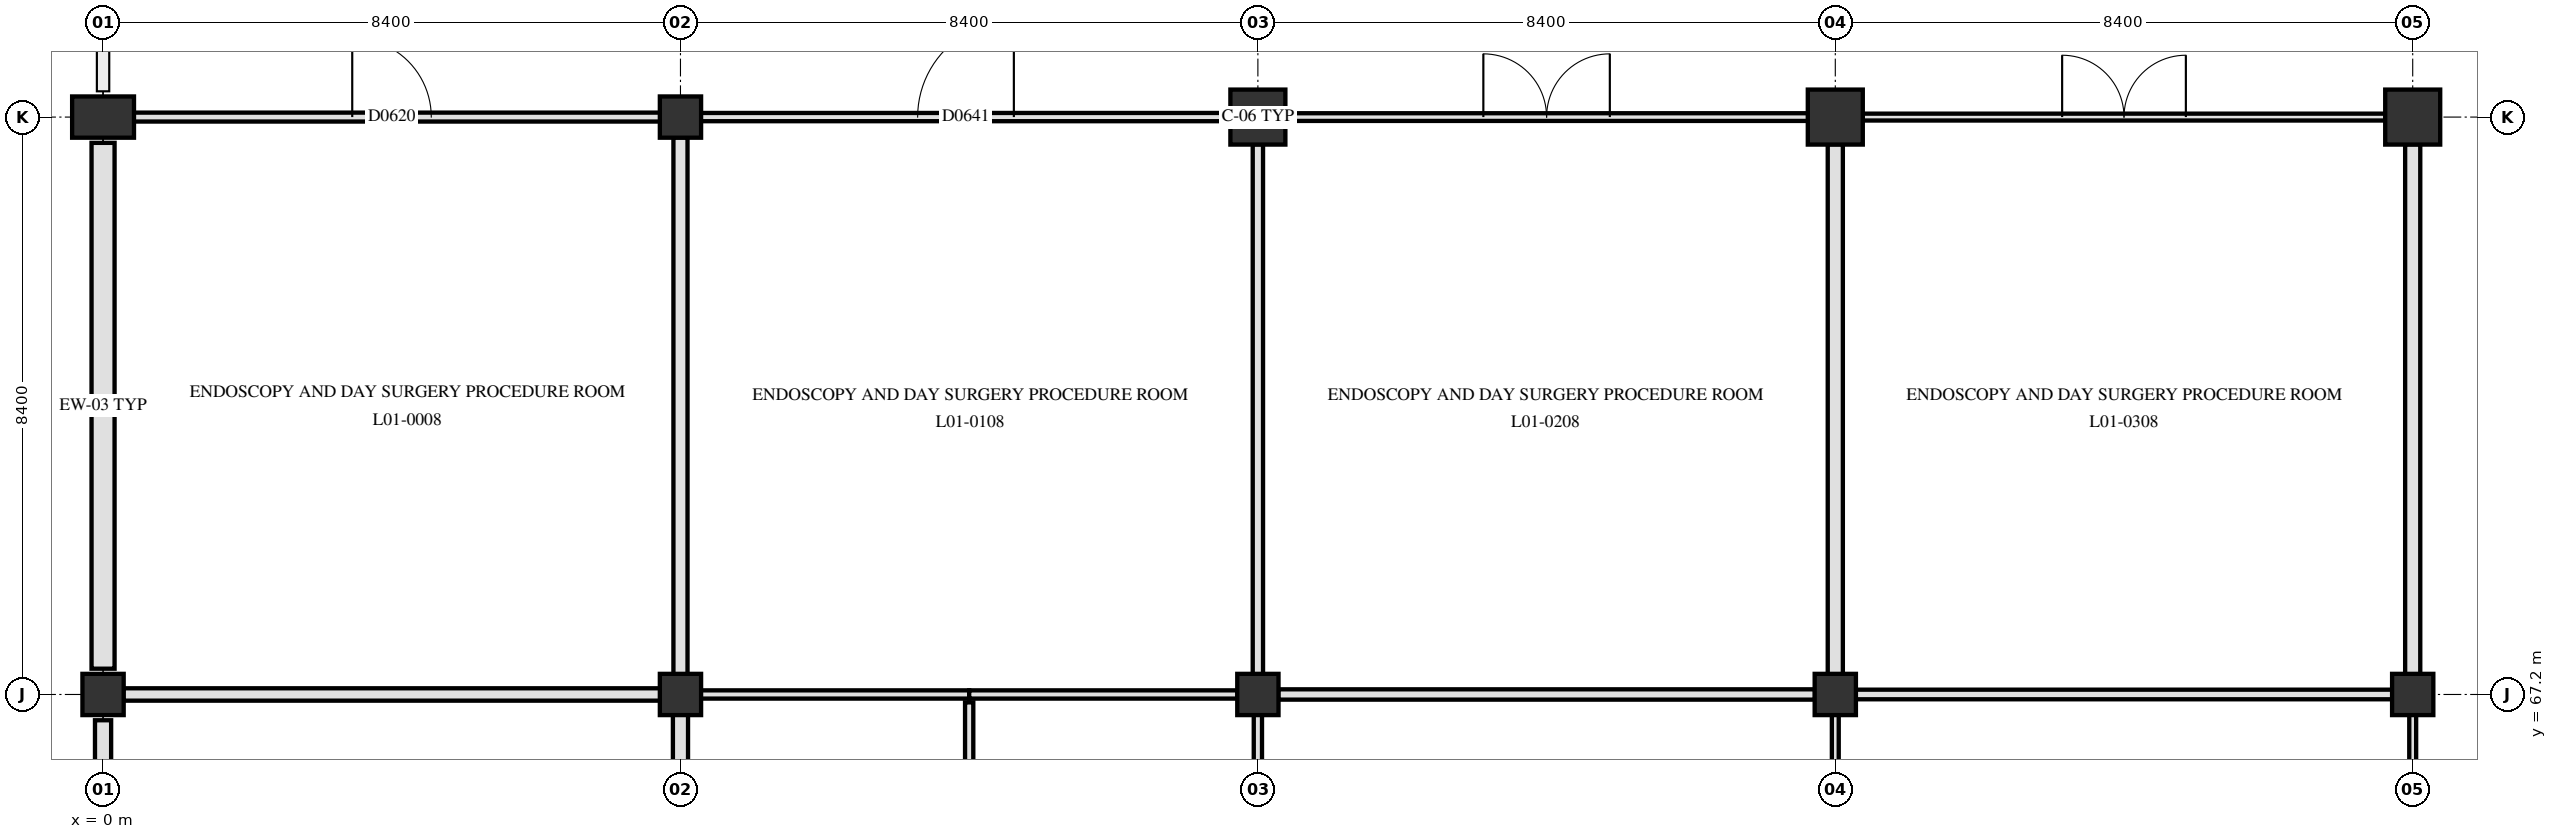
"""IFC4 building model, lengths in metres.
Left out: names, types, materials, properties, quantities, classifications, styles, units other than length and angle.
Written with IfcOpenShell. Run it as: python <this file> out.ifc"""

import sys

from ifc_helpers import new_model, si_unit, direction, frame, frame_2d, origin, origin_2d, place, context, subcontext, project, spatial, rectangle, circle, extrude, element, fill, save


model = new_model("IFC4")
c1 = context("Model", 3, precision=1e-05, world=origin(), true_north=direction((0.0, 1.0)))
c2 = subcontext(c1, "Body", "Model", "MODEL_VIEW")
j1 = project(units=[si_unit("LENGTHUNIT", "METRE"), si_unit("PLANEANGLEUNIT", "RADIAN")], contexts=[c1])
p1 = place(None, origin())
s1 = spatial("IfcSite", under=j1, at=p1, CompositionType="ELEMENT")
p2 = place(p1, origin())
s2 = spatial("IfcBuilding", under=s1, at=p2, CompositionType="ELEMENT")
p3 = place(p2, frame((0.0, 0.0, 4.8)))
s3 = spatial("IfcBuildingStorey", under=s2, at=p3, CompositionType="ELEMENT", Elevation=4.8)
p4 = place(p3, frame((0.0, 67.2, 0.0), z_axis=(0.0, 0.0, 1.0), x_axis=(1.0, 0.0, 0.0)))
e1 = element("IfcColumn", 1, at=p4, inside=s3, PredefinedType="COLUMN", context=c2, shape_type="SweptSolid", body=[
    extrude(rectangle(XDim=0.6, YDim=0.6, at=origin_2d()), origin(), (0.0, 0.0, 1.0), 4.5),
])
p5 = place(p3, frame((0.0, 75.6, 0.0), z_axis=(0.0, 0.0, 1.0), x_axis=(0.0, 1.0, 0.0)))
e2 = element("IfcColumn", 2, at=p5, inside=s3, PredefinedType="PILASTER", context=c2, shape_type="SweptSolid", body=[
    extrude(rectangle(XDim=0.6, YDim=0.9, at=origin_2d()), origin(), (0.0, 0.0, 1.0), 4.5),
])
for number, where, z_axis, x_axis in (
    (3, (8.4, 67.2, 0.0), (0.0, 0.0, 1.0), (1.0, 0.0, 0.0)),
    (4, (8.4, 75.6, 0.0), (0.0, 0.0, 1.0), (1.0, 0.0, 0.0)),
    (5, (16.8, 67.2, 0.0), (0.0, 0.0, 1.0), (1.0, 0.0, 0.0)),
):
    element("IfcColumn", number, at=place(p3, frame(where, z_axis=z_axis, x_axis=x_axis)), inside=s3, PredefinedType="COLUMN", context=c2, shape_type="SweptSolid", body=[
        extrude(rectangle(XDim=0.6, YDim=0.6, at=origin_2d()), origin(), (0.0, 0.0, 1.0), 4.5),
    ])
p6 = place(p3, frame((16.8, 75.6, 0.0), z_axis=(0.0, 0.0, 1.0), x_axis=(1.0, 0.0, 0.0)))
e6 = element("IfcColumn", 6, at=p6, inside=s3, PredefinedType="COLUMN", context=c2, shape_type="SweptSolid", body=[
    extrude(circle(Radius=0.4, at=origin_2d()), origin(), (0.0, 0.0, 1.0), 4.5),
])
p7 = place(p3, frame((25.2, 67.2, 0.0), z_axis=(0.0, 0.0, 1.0), x_axis=(1.0, 0.0, 0.0)))
e7 = element("IfcColumn", 7, at=p7, inside=s3, PredefinedType="COLUMN", context=c2, shape_type="SweptSolid", body=[
    extrude(rectangle(XDim=0.6, YDim=0.6, at=origin_2d()), origin(), (0.0, 0.0, 1.0), 4.5),
])
p8 = place(p3, frame((25.2, 75.6, 0.0), z_axis=(0.0, 0.0, 1.0), x_axis=(1.0, 0.0, 0.0)))
e8 = element("IfcColumn", 8, at=p8, inside=s3, PredefinedType="COLUMN", context=c2, shape_type="SweptSolid", body=[
    extrude(circle(Radius=0.4, at=origin_2d()), origin(), (0.0, 0.0, 1.0), 4.5),
])
p9 = place(p3, frame((33.6, 67.2, 0.0), z_axis=(0.0, 0.0, 1.0), x_axis=(1.0, 0.0, 0.0)))
e9 = element("IfcColumn", 9, at=p9, inside=s3, PredefinedType="COLUMN", context=c2, shape_type="SweptSolid", body=[
    extrude(rectangle(XDim=0.6, YDim=0.6, at=origin_2d()), origin(), (0.0, 0.0, 1.0), 4.5),
])
p10 = place(p3, frame((33.6, 75.6, 0.0), z_axis=(0.0, 0.0, 1.0), x_axis=(1.0, 0.0, 0.0)))
e10 = element("IfcColumn", 10, at=p10, inside=s3, PredefinedType="COLUMN", context=c2, shape_type="SweptSolid", body=[
    extrude(circle(Radius=0.4, at=origin_2d()), origin(), (0.0, 0.0, 1.0), 4.5),
])
p11 = place(p3, frame((0.0, 59.175, 0.0), z_axis=(0.0, 0.0, 1.0), x_axis=(0.0, 1.0, 0.0)))
e11 = element("IfcWall", 11, at=p11, inside=s3, PredefinedType="SOLIDWALL", context=c2, shape_type="SweptSolid", body=[
    extrude(rectangle(XDim=7.65, YDim=0.235, at=frame_2d((3.825, 0.0))), origin(), (0.0, 0.0, 1.0), 3.44),
])
p12 = place(p11, frame((1.137, 0.0, 0.85)))
e12 = element("IfcOpeningElement", 12, at=p12, cuts=e11, PredefinedType="OPENING", context=c2, shape_type="SweptSolid", body=[
    extrude(rectangle(XDim=1.55, YDim=1.54, at=frame_2d((0.775, 0.77))), frame((0.0, 0.127, 0.0), z_axis=(0.0, -1.0, 0.0), x_axis=(1.0, 0.0, 0.0)), (0.0, 0.0, 1.0), 0.255),
])
p13 = place(p11, frame((4.913, 0.0, 0.85)))
e13 = element("IfcOpeningElement", 13, at=p13, cuts=e11, PredefinedType="OPENING", context=c2, shape_type="SweptSolid", body=[
    extrude(rectangle(XDim=1.65, YDim=1.54, at=frame_2d((0.825, 0.77))), frame((0.0, 0.127, 0.0), z_axis=(0.0, -1.0, 0.0), x_axis=(1.0, 0.0, 0.0)), (0.0, 0.0, 1.0), 0.255),
])
p14 = place(p3, frame((0.0, 67.575, 0.0), z_axis=(0.0, 0.0, 1.0), x_axis=(0.0, 1.0, 0.0)))
e14 = element("IfcWall", 14, at=p14, inside=s3, PredefinedType="SOLIDWALL", context=c2, shape_type="SweptSolid", body=[
    extrude(rectangle(XDim=7.65, YDim=0.335, at=frame_2d((3.825, 0.0))), origin(), (0.0, 0.0, 1.0), 3.44),
])
p15 = place(p3, frame((0.295, 67.2, 0.0), z_axis=(0.0, 0.0, 1.0), x_axis=(1.0, 0.0, 0.0)))
e15 = element("IfcWall", 15, at=p15, inside=s3, PredefinedType="PARTITIONING", context=c2, shape_type="SweptSolid", body=[
    extrude(rectangle(XDim=7.81, YDim=0.18, at=frame_2d((3.905, 0.0))), origin(), (0.0, 0.0, 1.0), 3.54),
])
p16 = place(p3, frame((8.695, 67.2, 0.0), z_axis=(0.0, 0.0, 1.0), x_axis=(1.0, 0.0, 0.0)))
e16 = element("IfcWall", 16, at=p16, inside=s3, PredefinedType="PARTITIONING", context=c2, shape_type="SweptSolid", body=[
    extrude(rectangle(XDim=3.905, YDim=0.12, at=frame_2d((1.953, 0.0))), origin(), (0.0, 0.0, 1.0), 3.54),
])
p17 = place(p3, frame((12.6, 67.2, 0.0), z_axis=(0.0, 0.0, 1.0), x_axis=(1.0, 0.0, 0.0)))
e17 = element("IfcWall", 17, at=p17, inside=s3, PredefinedType="PARTITIONING", context=c2, shape_type="SweptSolid", body=[
    extrude(rectangle(XDim=3.905, YDim=0.12, at=frame_2d((1.952, 0.0))), origin(), (0.0, 0.0, 1.0), 3.54),
])
p18 = place(p3, frame((17.095, 67.2, 0.0), z_axis=(0.0, 0.0, 1.0), x_axis=(1.0, 0.0, 0.0)))
e18 = element("IfcWall", 18, at=p18, inside=s3, PredefinedType="PARTITIONING", context=c2, shape_type="SweptSolid", body=[
    extrude(rectangle(XDim=7.81, YDim=0.15, at=frame_2d((3.905, 0.0))), origin(), (0.0, 0.0, 1.0), 3.54),
])
p19 = place(p3, frame((25.495, 67.2, 0.0), z_axis=(0.0, 0.0, 1.0), x_axis=(1.0, 0.0, 0.0)))
e19 = element("IfcWall", 19, at=p19, inside=s3, PredefinedType="PARTITIONING", context=c2, shape_type="SweptSolid", body=[
    extrude(rectangle(XDim=7.81, YDim=0.14, at=frame_2d((3.905, 0.0))), origin(), (0.0, 0.0, 1.0), 3.54),
])
p20 = place(p3, frame((0.295, 75.6, 0.0), z_axis=(0.0, 0.0, 1.0), x_axis=(1.0, 0.0, 0.0)))
e20 = element("IfcWall", 20, at=p20, inside=s3, PredefinedType="PARTITIONING", context=c2, shape_type="SweptSolid", body=[
    extrude(rectangle(XDim=7.81, YDim=0.13, at=frame_2d((3.905, 0.0))), origin(), (0.0, 0.0, 1.0), 3.54),
])
p21 = place(p20, frame((3.33, 0.0, 0.0)))
e21 = element("IfcOpeningElement", 21, at=p21, cuts=e20, PredefinedType="OPENING", context=c2, shape_type="SweptSolid", body=[
    extrude(rectangle(XDim=1.15, YDim=2.15, at=frame_2d((0.575, 1.075))), frame((0.0, 0.075, 0.0), z_axis=(0.0, -1.0, 0.0), x_axis=(1.0, 0.0, 0.0)), (0.0, 0.0, 1.0), 0.15),
])
p22 = place(p3, frame((8.695, 75.6, 0.0), z_axis=(0.0, 0.0, 1.0), x_axis=(1.0, 0.0, 0.0)))
e22 = element("IfcWall", 22, at=p22, inside=s3, PredefinedType="PARTITIONING", context=c2, shape_type="SweptSolid", body=[
    extrude(rectangle(XDim=7.71, YDim=0.12, at=frame_2d((3.855, 0.0))), origin(), (0.0, 0.0, 1.0), 3.54),
])
p23 = place(p22, frame((3.155, 0.0, 0.0)))
e23 = element("IfcOpeningElement", 23, at=p23, cuts=e22, PredefinedType="OPENING", context=c2, shape_type="SweptSolid", body=[
    extrude(rectangle(XDim=1.4, YDim=2.2, at=frame_2d((0.7, 1.1))), frame((0.0, 0.07, 0.0), z_axis=(0.0, -1.0, 0.0), x_axis=(1.0, 0.0, 0.0)), (0.0, 0.0, 1.0), 0.14),
])
p24 = place(p3, frame((17.195, 75.6, 0.0), z_axis=(0.0, 0.0, 1.0), x_axis=(1.0, 0.0, 0.0)))
e24 = element("IfcWall", 24, at=p24, inside=s3, PredefinedType="PARTITIONING", context=c2, shape_type="SweptSolid", body=[
    extrude(rectangle(XDim=7.61, YDim=0.112, at=frame_2d((3.805, 0.0))), origin(), (0.0, 0.0, 1.0), 3.54),
])
p25 = place(p24, frame((2.885, 0.0, 0.0)))
e25 = element("IfcOpeningElement", 25, at=p25, cuts=e24, PredefinedType="OPENING", context=c2, shape_type="SweptSolid", body=[
    extrude(rectangle(XDim=1.84, YDim=2.28, at=frame_2d((0.92, 1.14))), frame((0.0, 0.066, 0.0), z_axis=(0.0, -1.0, 0.0), x_axis=(1.0, 0.0, 0.0)), (0.0, 0.0, 1.0), 0.132),
])
p26 = place(p3, frame((25.595, 75.6, 0.0), z_axis=(0.0, 0.0, 1.0), x_axis=(1.0, 0.0, 0.0)))
e26 = element("IfcWall", 26, at=p26, inside=s3, PredefinedType="PARTITIONING", context=c2, shape_type="SweptSolid", body=[
    extrude(rectangle(XDim=7.61, YDim=0.1, at=frame_2d((3.805, 0.0))), origin(), (0.0, 0.0, 1.0), 3.54),
])
p27 = place(p26, frame((2.905, 0.0, 0.0)))
e27 = element("IfcOpeningElement", 27, at=p27, cuts=e26, PredefinedType="OPENING", context=c2, shape_type="SweptSolid", body=[
    extrude(rectangle(XDim=1.8, YDim=2.25, at=frame_2d((0.9, 1.125))), frame((0.0, 0.06, 0.0), z_axis=(0.0, -1.0, 0.0), x_axis=(1.0, 0.0, 0.0)), (0.0, 0.0, 1.0), 0.12),
])
p28 = place(p3, frame((8.4, 61.515, 0.0), z_axis=(0.0, 0.0, 1.0), x_axis=(0.0, 1.0, 0.0)))
e28 = element("IfcWall", 28, at=p28, inside=s3, PredefinedType="PARTITIONING", context=c2, shape_type="SweptSolid", body=[
    extrude(rectangle(XDim=5.39, YDim=0.22, at=frame_2d((2.695, 0.0))), origin(), (0.0, 0.0, 1.0), 3.59),
])
p29 = place(p3, frame((8.4, 67.495, 0.0), z_axis=(0.0, 0.0, 1.0), x_axis=(0.0, 1.0, 0.0)))
e29 = element("IfcWall", 29, at=p29, inside=s3, PredefinedType="PARTITIONING", context=c2, shape_type="SweptSolid", body=[
    extrude(rectangle(XDim=7.81, YDim=0.205, at=frame_2d((3.905, 0.0))), origin(), (0.0, 0.0, 1.0), 3.59),
])
p30 = place(p3, frame((12.6, 61.515, 0.0), z_axis=(0.0, 0.0, 1.0), x_axis=(0.0, 1.0, 0.0)))
e30 = element("IfcWall", 30, at=p30, inside=s3, PredefinedType="PARTITIONING", context=c2, shape_type="SweptSolid", body=[
    extrude(rectangle(XDim=5.57, YDim=0.12, at=frame_2d((2.785, 0.0))), origin(), (0.0, 0.0, 1.0), 3.54),
])
p31 = place(p3, frame((16.8, 61.515, 0.0), z_axis=(0.0, 0.0, 1.0), x_axis=(0.0, 1.0, 0.0)))
e31 = element("IfcWall", 31, at=p31, inside=s3, PredefinedType="PARTITIONING", context=c2, shape_type="SweptSolid", body=[
    extrude(rectangle(XDim=5.39, YDim=0.12, at=frame_2d((2.695, 0.0))), origin(), (0.0, 0.0, 1.0), 3.59),
])
p32 = place(p3, frame((16.8, 67.495, 0.0), z_axis=(0.0, 0.0, 1.0), x_axis=(0.0, 1.0, 0.0)))
e32 = element("IfcWall", 32, at=p32, inside=s3, PredefinedType="PARTITIONING", context=c2, shape_type="SweptSolid", body=[
    extrude(rectangle(XDim=7.71, YDim=0.15, at=frame_2d((3.855, 0.0))), origin(), (0.0, 0.0, 1.0), 3.59),
])
p33 = place(p3, frame((25.2, 61.515, 0.0), z_axis=(0.0, 0.0, 1.0), x_axis=(0.0, 1.0, 0.0)))
e33 = element("IfcWall", 33, at=p33, inside=s3, PredefinedType="PARTITIONING", context=c2, shape_type="SweptSolid", body=[
    extrude(rectangle(XDim=5.39, YDim=0.1, at=frame_2d((2.695, 0.0))), origin(), (0.0, 0.0, 1.0), 3.59),
])
p34 = place(p3, frame((25.2, 67.495, 0.0), z_axis=(0.0, 0.0, 1.0), x_axis=(0.0, 1.0, 0.0)))
e34 = element("IfcWall", 34, at=p34, inside=s3, PredefinedType="PARTITIONING", context=c2, shape_type="SweptSolid", body=[
    extrude(rectangle(XDim=7.71, YDim=0.22, at=frame_2d((3.855, 0.0))), origin(), (0.0, 0.0, 1.0), 3.59),
])
p35 = place(p3, frame((33.6, 61.515, 0.0), z_axis=(0.0, 0.0, 1.0), x_axis=(0.0, 1.0, 0.0)))
e35 = element("IfcWall", 35, at=p35, inside=s3, PredefinedType="PARTITIONING", context=c2, shape_type="SweptSolid", body=[
    extrude(rectangle(XDim=5.39, YDim=0.1, at=frame_2d((2.695, 0.0))), origin(), (0.0, 0.0, 1.0), 3.59),
])
p36 = place(p3, frame((33.6, 67.495, 0.0), z_axis=(0.0, 0.0, 1.0), x_axis=(0.0, 1.0, 0.0)))
e36 = element("IfcWall", 36, at=p36, inside=s3, PredefinedType="PARTITIONING", context=c2, shape_type="SweptSolid", body=[
    extrude(rectangle(XDim=7.71, YDim=0.22, at=frame_2d((3.855, 0.0))), origin(), (0.0, 0.0, 1.0), 3.59),
])
p37 = place(p21, origin())
e37 = element("IfcDoor", 37, at=p37, inside=s3, OperationType="SINGLE_SWING_LEFT", PredefinedType="DOOR", context=c2, shape_type="SweptSolid", body=[
    extrude(rectangle(XDim=1.15, YDim=2.15, at=frame_2d((0.575, 1.075))), frame((0.0, 0.025, 0.0), z_axis=(0.0, -1.0, 0.0), x_axis=(1.0, 0.0, 0.0)), (0.0, 0.0, 1.0), 0.05),
])
fill(e21, e37)
p38 = place(p23, origin())
e38 = element("IfcDoor", 38, at=p38, inside=s3, OperationType="SINGLE_SWING_RIGHT", PredefinedType="DOOR", context=c2, shape_type="SweptSolid", body=[
    extrude(rectangle(XDim=1.4, YDim=2.2, at=frame_2d((0.7, 1.1))), frame((0.0, 0.025, 0.0), z_axis=(0.0, -1.0, 0.0), x_axis=(1.0, 0.0, 0.0)), (0.0, 0.0, 1.0), 0.05),
])
fill(e23, e38)
p39 = place(p25, origin())
e39 = element("IfcDoor", 39, at=p39, inside=s3, OperationType="DOUBLE_SWING_LEFT", PredefinedType="DOOR", context=c2, shape_type="SweptSolid", body=[
    extrude(rectangle(XDim=1.84, YDim=2.28, at=frame_2d((0.92, 1.14))), frame((0.0, 0.025, 0.0), z_axis=(0.0, -1.0, 0.0), x_axis=(1.0, 0.0, 0.0)), (0.0, 0.0, 1.0), 0.05),
])
fill(e25, e39)
p40 = place(p27, origin())
e40 = element("IfcDoor", 40, at=p40, inside=s3, OperationType="DOUBLE_SWING_RIGHT", PredefinedType="DOOR", context=c2, shape_type="SweptSolid", body=[
    extrude(rectangle(XDim=1.8, YDim=2.25, at=frame_2d((0.9, 1.125))), frame((0.0, 0.025, 0.0), z_axis=(0.0, -1.0, 0.0), x_axis=(1.0, 0.0, 0.0)), (0.0, 0.0, 1.0), 0.05),
])
fill(e27, e40)
save(model, sys.argv[1])
